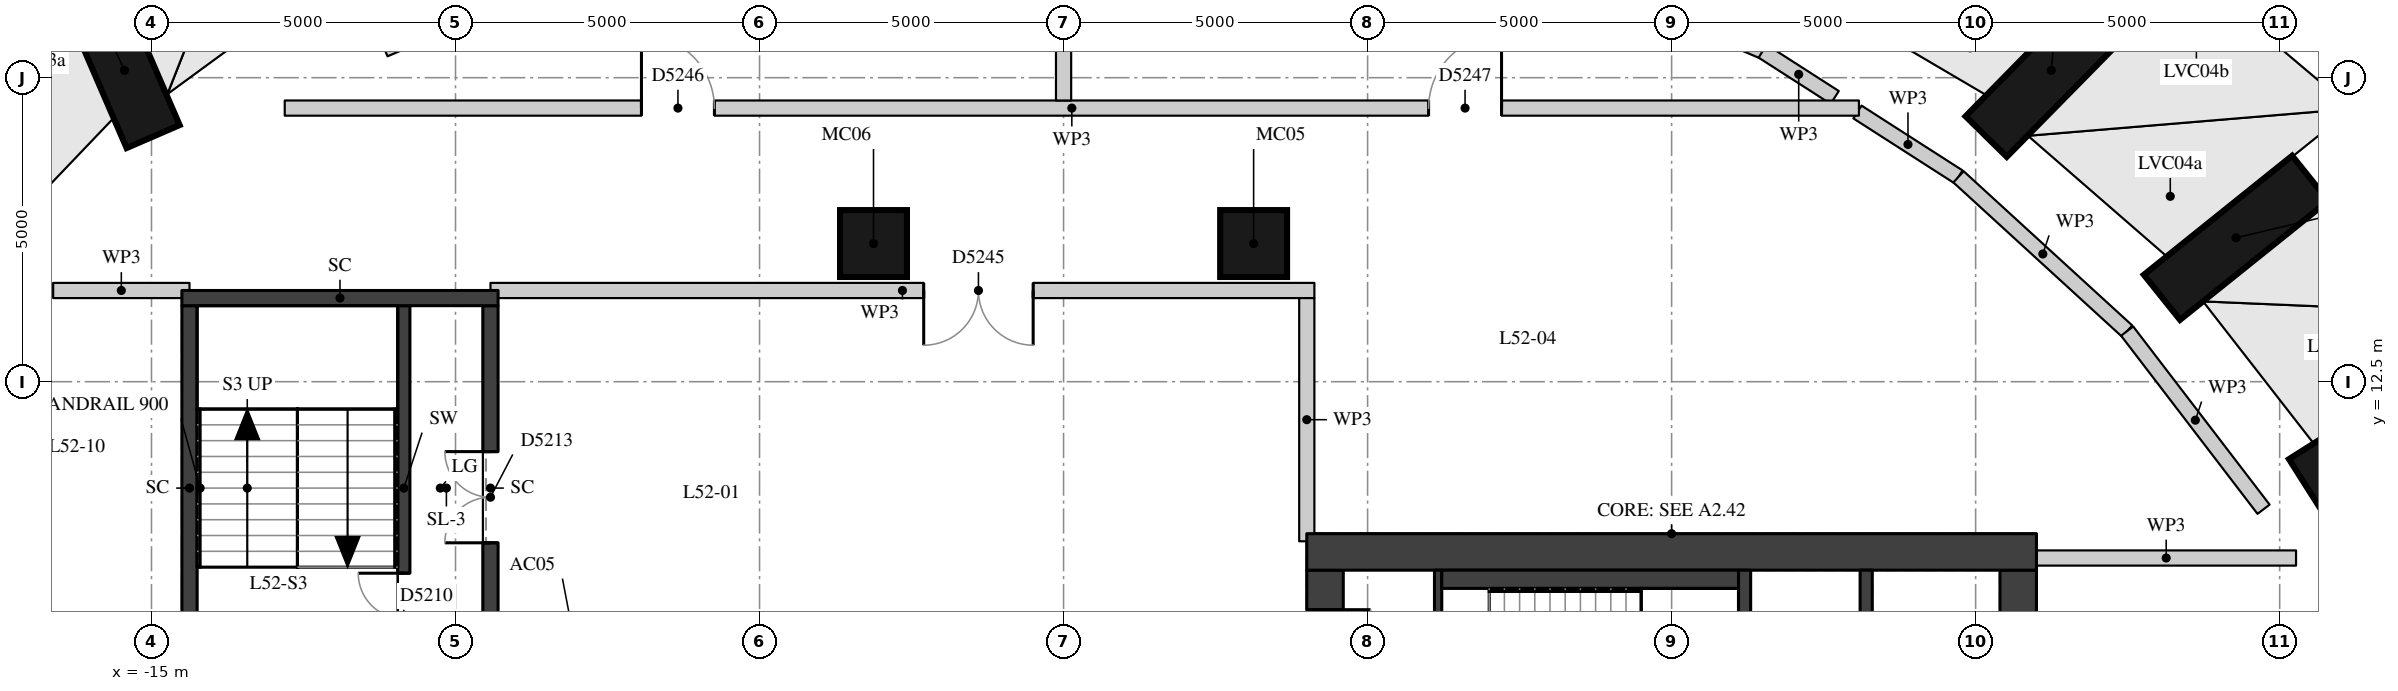
"""IFC4 building model, lengths in metres.
Left out: names, types, materials, properties, quantities, classifications, styles, units other than length and angle.
Written with IfcOpenShell. Run it as: python <this file> out.ifc"""

import sys

from ifc_helpers import new_model, si_unit, direction, frame, frame_2d, origin, origin_2d, place, context, subcontext, project, spatial, rectangle, extrude, element, fill, save


model = new_model("IFC4")
c1 = context("Model", 3, precision=1e-05, world=origin(), true_north=direction((0.0, 1.0)))
c2 = subcontext(c1, "Body", "Model", "MODEL_VIEW")
j1 = project(units=[si_unit("LENGTHUNIT", "METRE"), si_unit("PLANEANGLEUNIT", "RADIAN")], contexts=[c1])
p1 = place(None, origin())
s1 = spatial("IfcSite", under=j1, at=p1, CompositionType="ELEMENT")
p2 = place(p1, origin())
s2 = spatial("IfcBuilding", under=s1, at=p2, CompositionType="ELEMENT")
p3 = place(p2, frame((0.0, 0.0, 184.7)))
s3 = spatial("IfcBuildingStorey", under=s2, at=p3, CompositionType="ELEMENT", Elevation=184.7)
p4 = place(p3, frame((20.408, 10.825, 0.504), z_axis=(0.567801006315, 0.360368098348, 0.740092461062), x_axis=(-0.624865485454, -0.396585395608, 0.672505129408)))
e1 = element("IfcColumn", 1, at=p4, inside=s3, PredefinedType="COLUMN", context=c2, shape_type="SweptSolid", body=[
    extrude(rectangle(XDim=1.5, YDim=0.95, at=origin_2d()), origin(), (0.0, 0.0, 1.0), 4.717),
])
p5 = place(p3, frame((18.064, 13.888, 0.5), z_axis=(0.519515908892, 0.416944285711, 0.745828856388), x_axis=(-0.581666535147, -0.466824083474, 0.666137611143)))
e2 = element("IfcColumn", 2, at=p5, inside=s3, PredefinedType="COLUMN", context=c2, shape_type="SweptSolid", body=[
    extrude(rectangle(XDim=1.5, YDim=0.95, at=origin_2d()), origin(), (0.0, 0.0, 1.0), 4.694),
])
p6 = place(p3, frame((15.173, 16.532, 0.492), z_axis=(0.459982237547, 0.467686167012, 0.754775456892), x_axis=(-0.529256363481, -0.538120518139, 0.655983238866)))
e3 = element("IfcColumn", 3, at=p6, inside=s3, PredefinedType="COLUMN", context=c2, shape_type="SweptSolid", body=[
    extrude(rectangle(XDim=1.5, YDim=0.95, at=origin_2d()), origin(), (0.0, 0.0, 1.0), 4.658),
])
p7 = place(p3, frame((-14.973, 16.532, 0.406), z_axis=(-0.214919524753, 0.496747433021, 0.840863595161), x_axis=(0.333891871212, -0.771730395932, 0.541247091755)))
e4 = element("IfcColumn", 4, at=p7, inside=s3, PredefinedType="COLUMN", context=c2, shape_type="SweptSolid", body=[
    extrude(rectangle(XDim=1.5, YDim=0.95, at=origin_2d()), origin(), (0.0, 0.0, 1.0), 4.386),
])
for number, where, z_axis, x_axis in (
    (5, (3.126, 14.772, 0.0), (0.0, 0.0, 1.0), (1.0, 0.0, 0.0)),
    (6, (-3.126, 14.772, 0.0), (0.0, 0.0, 1.0), (1.0, 0.0, 0.0)),
):
    element("IfcColumn", number, at=place(p3, frame(where, z_axis=z_axis, x_axis=x_axis)), inside=s3, PredefinedType="COLUMN", context=c2, shape_type="SweptSolid", body=[
        extrude(rectangle(XDim=1.1, YDim=1.1, at=origin_2d()), origin(), (0.0, 0.0, 1.0), 4.5),
    ])
p8 = place(p3, frame((4.3, -9.4, 0.0), z_axis=(0.0, 0.0, 1.0), x_axis=(0.0, 1.0, 0.0)))
e7 = element("IfcWall", 7, at=p8, inside=s3, PredefinedType="SHEAR", context=c2, shape_type="SweptSolid", body=[
    extrude(rectangle(XDim=18.8, YDim=0.6, at=frame_2d((9.4, 0.0))), origin(), (0.0, 0.0, 1.0), 4.22),
])
p9 = place(p8, frame((0.65, 0.0, 0.0)))
e8 = element("IfcOpeningElement", 8, at=p9, cuts=e7, PredefinedType="OPENING", context=c2, shape_type="SweptSolid", body=[
    extrude(rectangle(XDim=1.5, YDim=2.1, at=frame_2d((0.75, 1.05))), frame((0.0, 0.31, 0.0), z_axis=(0.0, -1.0, 0.0), x_axis=(1.0, 0.0, 0.0)), (0.0, 0.0, 1.0), 0.62),
])
p10 = place(p8, frame((3.75, 0.0, 0.0)))
e9 = element("IfcOpeningElement", 9, at=p10, cuts=e7, PredefinedType="OPENING", context=c2, shape_type="SweptSolid", body=[
    extrude(rectangle(XDim=1.8, YDim=2.1, at=frame_2d((0.9, 1.05))), frame((0.0, 0.31, 0.0), z_axis=(0.0, -1.0, 0.0), x_axis=(1.0, 0.0, 0.0)), (0.0, 0.0, 1.0), 0.62),
])
p11 = place(p8, frame((6.25, 0.0, 0.0)))
e10 = element("IfcOpeningElement", 10, at=p11, cuts=e7, PredefinedType="OPENING", context=c2, shape_type="SweptSolid", body=[
    extrude(rectangle(XDim=1.1, YDim=2.1, at=frame_2d((0.55, 1.05))), frame((0.0, 0.31, 0.0), z_axis=(0.0, -1.0, 0.0), x_axis=(1.0, 0.0, 0.0)), (0.0, 0.0, 1.0), 0.62),
])
p12 = place(p8, frame((8.9, 0.0, 0.0)))
e11 = element("IfcOpeningElement", 11, at=p12, cuts=e7, PredefinedType="OPENING", context=c2, shape_type="SweptSolid", body=[
    extrude(rectangle(XDim=1.0, YDim=2.1, at=frame_2d((0.5, 1.05))), frame((0.0, 0.31, 0.0), z_axis=(0.0, -1.0, 0.0), x_axis=(1.0, 0.0, 0.0)), (0.0, 0.0, 1.0), 0.62),
])
p13 = place(p8, frame((11.45, 0.0, 0.0)))
e12 = element("IfcOpeningElement", 12, at=p13, cuts=e7, PredefinedType="OPENING", context=c2, shape_type="SweptSolid", body=[
    extrude(rectangle(XDim=1.1, YDim=2.1, at=frame_2d((0.55, 1.05))), frame((0.0, 0.31, 0.0), z_axis=(0.0, -1.0, 0.0), x_axis=(1.0, 0.0, 0.0)), (0.0, 0.0, 1.0), 0.62),
])
p14 = place(p8, frame((13.25, 0.0, 0.0)))
e13 = element("IfcOpeningElement", 13, at=p14, cuts=e7, PredefinedType="OPENING", context=c2, shape_type="SweptSolid", body=[
    extrude(rectangle(XDim=1.8, YDim=2.1, at=frame_2d((0.9, 1.05))), frame((0.0, 0.31, 0.0), z_axis=(0.0, -1.0, 0.0), x_axis=(1.0, 0.0, 0.0)), (0.0, 0.0, 1.0), 0.62),
])
p15 = place(p8, frame((16.65, 0.0, 0.0)))
e14 = element("IfcOpeningElement", 14, at=p15, cuts=e7, PredefinedType="OPENING", context=c2, shape_type="SweptSolid", body=[
    extrude(rectangle(XDim=1.5, YDim=2.1, at=frame_2d((0.75, 1.05))), frame((0.0, 0.31, 0.0), z_axis=(0.0, -1.0, 0.0), x_axis=(1.0, 0.0, 0.0)), (0.0, 0.0, 1.0), 0.62),
])
p16 = place(p3, frame((15.7, -9.4, 0.0), z_axis=(0.0, 0.0, 1.0), x_axis=(0.0, 1.0, 0.0)))
e15 = element("IfcWall", 15, at=p16, inside=s3, PredefinedType="SHEAR", context=c2, shape_type="SweptSolid", body=[
    extrude(rectangle(XDim=18.8, YDim=0.6, at=frame_2d((9.4, 0.0))), origin(), (0.0, 0.0, 1.0), 4.22),
])
p17 = place(p3, frame((4.0, 9.7, 0.0), z_axis=(0.0, 0.0, 1.0), x_axis=(1.0, 0.0, 0.0)))
e16 = element("IfcWall", 16, at=p17, inside=s3, PredefinedType="SHEAR", context=c2, shape_type="SweptSolid", body=[
    extrude(rectangle(XDim=12.0, YDim=0.6, at=frame_2d((6.0, 0.0))), origin(), (0.0, 0.0, 1.0), 4.22),
])
for number, where, z_axis, x_axis in (
    (17, (11.2, 5.9, 0.0), (0.0, 0.0, 1.0), (0.0, 1.0, 0.0)),
    (18, (13.2, 5.9, 0.0), (0.0, 0.0, 1.0), (0.0, 1.0, 0.0)),
):
    element("IfcWall", number, at=place(p3, frame(where, z_axis=z_axis, x_axis=x_axis)), inside=s3, PredefinedType="SHEAR", context=c2, shape_type="SweptSolid", body=[
        extrude(rectangle(XDim=3.5, YDim=0.2, at=frame_2d((1.75, 0.0))), origin(), (0.0, 0.0, 1.0), 4.22),
    ])
p18 = place(p3, frame((6.16, 5.9, 0.0), z_axis=(0.0, 0.0, 1.0), x_axis=(0.0, 1.0, 0.0)))
e19 = element("IfcWall", 19, at=p18, inside=s3, PredefinedType="SHEAR", context=c2, shape_type="SweptSolid", body=[
    extrude(rectangle(XDim=3.5, YDim=0.12, at=frame_2d((1.75, 0.0))), origin(), (0.0, 0.0, 1.0), 4.22),
])
p19 = place(p18, frame((0.85, 0.0, 0.0)))
e20 = element("IfcOpeningElement", 20, at=p19, cuts=e19, PredefinedType="OPENING", context=c2, shape_type="SweptSolid", body=[
    extrude(rectangle(XDim=1.5, YDim=2.1, at=frame_2d((0.75, 1.05))), frame((0.0, 0.07, 0.0), z_axis=(0.0, -1.0, 0.0), x_axis=(1.0, 0.0, 0.0)), (0.0, 0.0, 1.0), 0.14),
])
p20 = place(p3, frame((-10.85, 7.75, 0.0), z_axis=(0.0, 0.0, 1.0), x_axis=(0.0, 1.0, 0.0)))
e21 = element("IfcWall", 21, at=p20, inside=s3, PredefinedType="SHEAR", context=c2, shape_type="SweptSolid", body=[
    extrude(rectangle(XDim=6.0, YDim=0.2, at=frame_2d((3.0, 0.0))), origin(), (0.0, 0.0, 1.0), 4.22),
])
p21 = place(p20, frame((0.1, 0.0, 0.0)))
e22 = element("IfcOpeningElement", 22, at=p21, cuts=e21, PredefinedType="OPENING", context=c2, shape_type="SweptSolid", body=[
    extrude(rectangle(XDim=1.5, YDim=2.1, at=frame_2d((0.75, 1.05))), frame((0.0, 0.11, 0.0), z_axis=(0.0, -1.0, 0.0), x_axis=(1.0, 0.0, 0.0)), (0.0, 0.0, 1.0), 0.22),
])
p22 = place(p3, frame((6.22, 9.25, 0.0), z_axis=(0.0, 0.0, 1.0), x_axis=(1.0, 0.0, 0.0)))
e23 = element("IfcWall", 23, at=p22, inside=s3, PredefinedType="PARTITIONING", context=c2, shape_type="SweptSolid", body=[
    extrude(rectangle(XDim=4.88, YDim=0.3, at=frame_2d((2.44, 0.0))), origin(), (0.0, 0.0, 1.0), 4.22),
])
p23 = place(p3, frame((-14.375, 7.75, -0.45), z_axis=(0.0, 0.0, 1.0), x_axis=(0.0, 1.0, 0.0)))
e24 = element("IfcWall", 24, at=p23, inside=s3, PredefinedType="SHEAR", context=c2, shape_type="SweptSolid", body=[
    extrude(rectangle(XDim=6.0, YDim=0.25, at=frame_2d((3.0, 0.0))), origin(), (0.0, 0.0, 1.0), 4.67),
])
p24 = place(p3, frame((-9.425, 7.75, -0.45), z_axis=(0.0, 0.0, 1.0), x_axis=(0.0, 1.0, 0.0)))
e25 = element("IfcWall", 25, at=p24, inside=s3, PredefinedType="SHEAR", context=c2, shape_type="SweptSolid", body=[
    extrude(rectangle(XDim=6.0, YDim=0.25, at=frame_2d((3.0, 0.0))), origin(), (0.0, 0.0, 1.0), 4.67),
])
p25 = place(p24, frame((2.1, 0.0, 0.45)))
e26 = element("IfcOpeningElement", 26, at=p25, cuts=e25, PredefinedType="OPENING", context=c2, shape_type="SweptSolid", body=[
    extrude(rectangle(XDim=1.5, YDim=2.1, at=frame_2d((0.75, 1.05))), frame((0.0, 0.135, 0.0), z_axis=(0.0, -1.0, 0.0), x_axis=(1.0, 0.0, 0.0)), (0.0, 0.0, 1.0), 0.27),
])
p26 = place(p3, frame((-14.5, 13.875, -0.45), z_axis=(0.0, 0.0, 1.0), x_axis=(1.0, 0.0, 0.0)))
e27 = element("IfcWall", 27, at=p26, inside=s3, PredefinedType="SHEAR", context=c2, shape_type="SweptSolid", body=[
    extrude(rectangle(XDim=5.2, YDim=0.25, at=frame_2d((2.6, 0.0))), origin(), (0.0, 0.0, 1.0), 4.67),
])
p27 = place(p3, frame((14.718, 15.869, 0.0), z_axis=(0.0, 0.0, 1.0), x_axis=(-0.841680298143, 0.539976180695, 0.0)))
e28 = element("IfcWall", 28, at=p27, inside=s3, PredefinedType="PARTITIONING", context=c2, shape_type="SweptSolid", body=[
    extrude(rectangle(XDim=1.974, YDim=0.25, at=frame_2d((0.987, 0.0))), origin(), (0.0, 0.0, 1.0), 4.22),
])
p28 = place(p3, frame((17.492, 13.332, 0.0), z_axis=(0.0, 0.0, 1.0), x_axis=(-0.737843952508, 0.674971334019, 0.0)))
e29 = element("IfcWall", 29, at=p28, inside=s3, PredefinedType="PARTITIONING", context=c2, shape_type="SweptSolid", body=[
    extrude(rectangle(XDim=3.759, YDim=0.25, at=frame_2d((1.879, 0.0))), origin(), (0.0, 0.0, 1.0), 4.22),
])
p29 = place(p3, frame((19.735, 10.402, 0.0), z_axis=(0.0, 0.0, 1.0), x_axis=(-0.607941133058, 0.793982102277, 0.0)))
e30 = element("IfcWall", 30, at=p29, inside=s3, PredefinedType="PARTITIONING", context=c2, shape_type="SweptSolid", body=[
    extrude(rectangle(XDim=3.69, YDim=0.25, at=frame_2d((1.845, 0.0))), origin(), (0.0, 0.0, 1.0), 4.22),
])
p30 = place(p3, frame((-7.586, 19.486, 0.0), z_axis=(0.0, 0.0, 1.0), x_axis=(-0.920602981077, -0.390499873536, 0.0)))
e31 = element("IfcWall", 31, at=p30, inside=s3, PredefinedType="PARTITIONING", context=c2, shape_type="SweptSolid", body=[
    extrude(rectangle(XDim=3.889, YDim=0.25, at=frame_2d((1.945, 0.0))), origin(), (0.0, 0.0, 1.0), 4.22),
])
p31 = place(p3, frame((11.498, 17.935, 0.0), z_axis=(0.0, 0.0, 1.0), x_axis=(-0.919440581638, 0.393228962359, 0.0)))
e32 = element("IfcWall", 32, at=p31, inside=s3, PredefinedType="PARTITIONING", context=c2, shape_type="SweptSolid", body=[
    extrude(rectangle(XDim=3.885, YDim=0.25, at=frame_2d((1.942, 0.0))), origin(), (0.0, 0.0, 1.0), 4.22),
])
p32 = place(p3, frame((12.683, 17.175, 0.0), z_axis=(0.0, 0.0, 1.0), x_axis=(-0.84171341623, 0.539924554858, 0.0)))
e33 = element("IfcWall", 33, at=p32, inside=s3, PredefinedType="PARTITIONING", context=c2, shape_type="SweptSolid", body=[
    extrude(rectangle(XDim=1.408, YDim=0.25, at=frame_2d((0.704, 0.0))), origin(), (0.0, 0.0, 1.0), 4.22),
])
p33 = place(p3, frame((15.998, 9.6, 0.0), z_axis=(0.0, 0.0, 1.0), x_axis=(1.0, 0.0, 0.0)))
e34 = element("IfcWall", 34, at=p33, inside=s3, PredefinedType="PARTITIONING", context=c2, shape_type="SweptSolid", body=[
    extrude(rectangle(XDim=4.271, YDim=0.25, at=frame_2d((2.136, 0.0))), origin(), (0.0, 0.0, 1.0), 4.22),
])
p34 = place(p3, frame((-16.617, 14.0, 0.0), z_axis=(0.0, 0.0, 1.0), x_axis=(1.0, 0.0, 0.0)))
e35 = element("IfcWall", 35, at=p34, inside=s3, PredefinedType="PARTITIONING", context=c2, shape_type="SweptSolid", body=[
    extrude(rectangle(XDim=2.242, YDim=0.25, at=frame_2d((1.121, 0.0))), origin(), (0.0, 0.0, 1.0), 4.22),
])
p35 = place(p3, frame((-9.425, 14.0, 0.0), z_axis=(0.0, 0.0, 1.0), x_axis=(1.0, 0.0, 0.0)))
e36 = element("IfcWall", 36, at=p35, inside=s3, PredefinedType="PARTITIONING", context=c2, shape_type="SweptSolid", body=[
    extrude(rectangle(XDim=13.55, YDim=0.25, at=frame_2d((6.775, 0.0))), origin(), (0.0, 0.0, 1.0), 4.22),
])
p36 = place(p35, frame((7.125, 0.0, 0.0)))
e37 = element("IfcOpeningElement", 37, at=p36, cuts=e36, PredefinedType="OPENING", context=c2, shape_type="SweptSolid", body=[
    extrude(rectangle(XDim=1.8, YDim=2.1, at=frame_2d((0.9, 1.05))), frame((0.0, 0.135, 0.0), z_axis=(0.0, -1.0, 0.0), x_axis=(1.0, 0.0, 0.0)), (0.0, 0.0, 1.0), 0.27),
])
p37 = place(p3, frame((-12.809, 17.0, 0.0), z_axis=(0.0, 0.0, 1.0), x_axis=(1.0, 0.0, 0.0)))
e38 = element("IfcWall", 38, at=p37, inside=s3, PredefinedType="PARTITIONING", context=c2, shape_type="SweptSolid", body=[
    extrude(rectangle(XDim=25.889, YDim=0.25, at=frame_2d((12.945, 0.0))), origin(), (0.0, 0.0, 1.0), 4.22),
])
p38 = place(p37, frame((5.867, 0.0, 0.0)))
e39 = element("IfcOpeningElement", 39, at=p38, cuts=e38, PredefinedType="OPENING", context=c2, shape_type="SweptSolid", body=[
    extrude(rectangle(XDim=1.2, YDim=2.1, at=frame_2d((0.6, 1.05))), frame((0.0, 0.135, 0.0), z_axis=(0.0, -1.0, 0.0), x_axis=(1.0, 0.0, 0.0)), (0.0, 0.0, 1.0), 0.27),
])
p39 = place(p37, frame((18.812, 0.0, 0.0)))
e40 = element("IfcOpeningElement", 40, at=p39, cuts=e38, PredefinedType="OPENING", context=c2, shape_type="SweptSolid", body=[
    extrude(rectangle(XDim=1.2, YDim=2.1, at=frame_2d((0.6, 1.05))), frame((0.0, 0.135, 0.0), z_axis=(0.0, -1.0, 0.0), x_axis=(1.0, 0.0, 0.0)), (0.0, 0.0, 1.0), 0.27),
])
p40 = place(p3, frame((0.0, 17.125, 0.0), z_axis=(0.0, 0.0, 1.0), x_axis=(0.0, 1.0, 0.0)))
e41 = element("IfcWall", 41, at=p40, inside=s3, PredefinedType="PARTITIONING", context=c2, shape_type="SweptSolid", body=[
    extrude(rectangle(XDim=3.71, YDim=0.25, at=frame_2d((1.855, 0.0))), origin(), (0.0, 0.0, 1.0), 3.67),
])
p41 = place(p3, frame((4.0, 9.875, 0.0), z_axis=(0.0, 0.0, 1.0), x_axis=(0.0, 1.0, 0.0)))
e42 = element("IfcWall", 42, at=p41, inside=s3, PredefinedType="PARTITIONING", context=c2, shape_type="SweptSolid", body=[
    extrude(rectangle(XDim=4.0, YDim=0.25, at=frame_2d((2.0, 0.0))), origin(), (0.0, 0.0, 1.0), 4.22),
])
p42 = place(p15, origin())
e43 = element("IfcDoor", 43, at=p42, inside=s3, OperationType="DOUBLE_DOOR_SINGLE_SWING", PredefinedType="DOOR", context=c2, shape_type="SweptSolid", body=[
    extrude(rectangle(XDim=1.5, YDim=2.1, at=frame_2d((0.75, 1.05))), frame((0.0, 0.025, 0.0), z_axis=(0.0, -1.0, 0.0), x_axis=(1.0, 0.0, 0.0)), (0.0, 0.0, 1.0), 0.05),
])
fill(e14, e43)
p43 = place(p21, origin())
e44 = element("IfcDoor", 44, at=p43, inside=s3, OperationType="DOUBLE_DOOR_SINGLE_SWING", PredefinedType="DOOR", context=c2, shape_type="SweptSolid", body=[
    extrude(rectangle(XDim=1.5, YDim=2.1, at=frame_2d((0.75, 1.05))), frame((0.0, 0.025, 0.0), z_axis=(0.0, -1.0, 0.0), x_axis=(1.0, 0.0, 0.0)), (0.0, 0.0, 1.0), 0.05),
])
fill(e22, e44)
p44 = place(p25, origin())
e45 = element("IfcDoor", 45, at=p44, inside=s3, OperationType="DOUBLE_DOOR_SINGLE_SWING", PredefinedType="DOOR", context=c2, shape_type="SweptSolid", body=[
    extrude(rectangle(XDim=1.5, YDim=2.1, at=frame_2d((0.75, 1.05))), frame((0.0, 0.025, 0.0), z_axis=(0.0, -1.0, 0.0), x_axis=(1.0, 0.0, 0.0)), (0.0, 0.0, 1.0), 0.05),
])
fill(e26, e45)
p45 = place(p38, origin())
e46 = element("IfcDoor", 46, at=p45, inside=s3, OperationType="SINGLE_SWING_LEFT", PredefinedType="DOOR", context=c2, shape_type="SweptSolid", body=[
    extrude(rectangle(XDim=1.2, YDim=2.1, at=frame_2d((0.6, 1.05))), frame((0.0, 0.025, 0.0), z_axis=(0.0, -1.0, 0.0), x_axis=(1.0, 0.0, 0.0)), (0.0, 0.0, 1.0), 0.05),
])
fill(e39, e46)
p46 = place(p39, origin())
e47 = element("IfcDoor", 47, at=p46, inside=s3, OperationType="SINGLE_SWING_RIGHT", PredefinedType="DOOR", context=c2, shape_type="SweptSolid", body=[
    extrude(rectangle(XDim=1.2, YDim=2.1, at=frame_2d((0.6, 1.05))), frame((0.0, 0.025, 0.0), z_axis=(0.0, -1.0, 0.0), x_axis=(1.0, 0.0, 0.0)), (0.0, 0.0, 1.0), 0.05),
])
fill(e40, e47)
p47 = place(p36, origin())
e48 = element("IfcDoor", 48, at=p47, inside=s3, OperationType="DOUBLE_DOOR_SINGLE_SWING", PredefinedType="DOOR", context=c2, shape_type="SweptSolid", body=[
    extrude(rectangle(XDim=1.8, YDim=2.1, at=frame_2d((0.9, 1.05))), frame((0.0, 0.025, 0.0), z_axis=(0.0, -1.0, 0.0), x_axis=(1.0, 0.0, 0.0)), (0.0, 0.0, 1.0), 0.05),
])
fill(e37, e48)
save(model, sys.argv[1])
